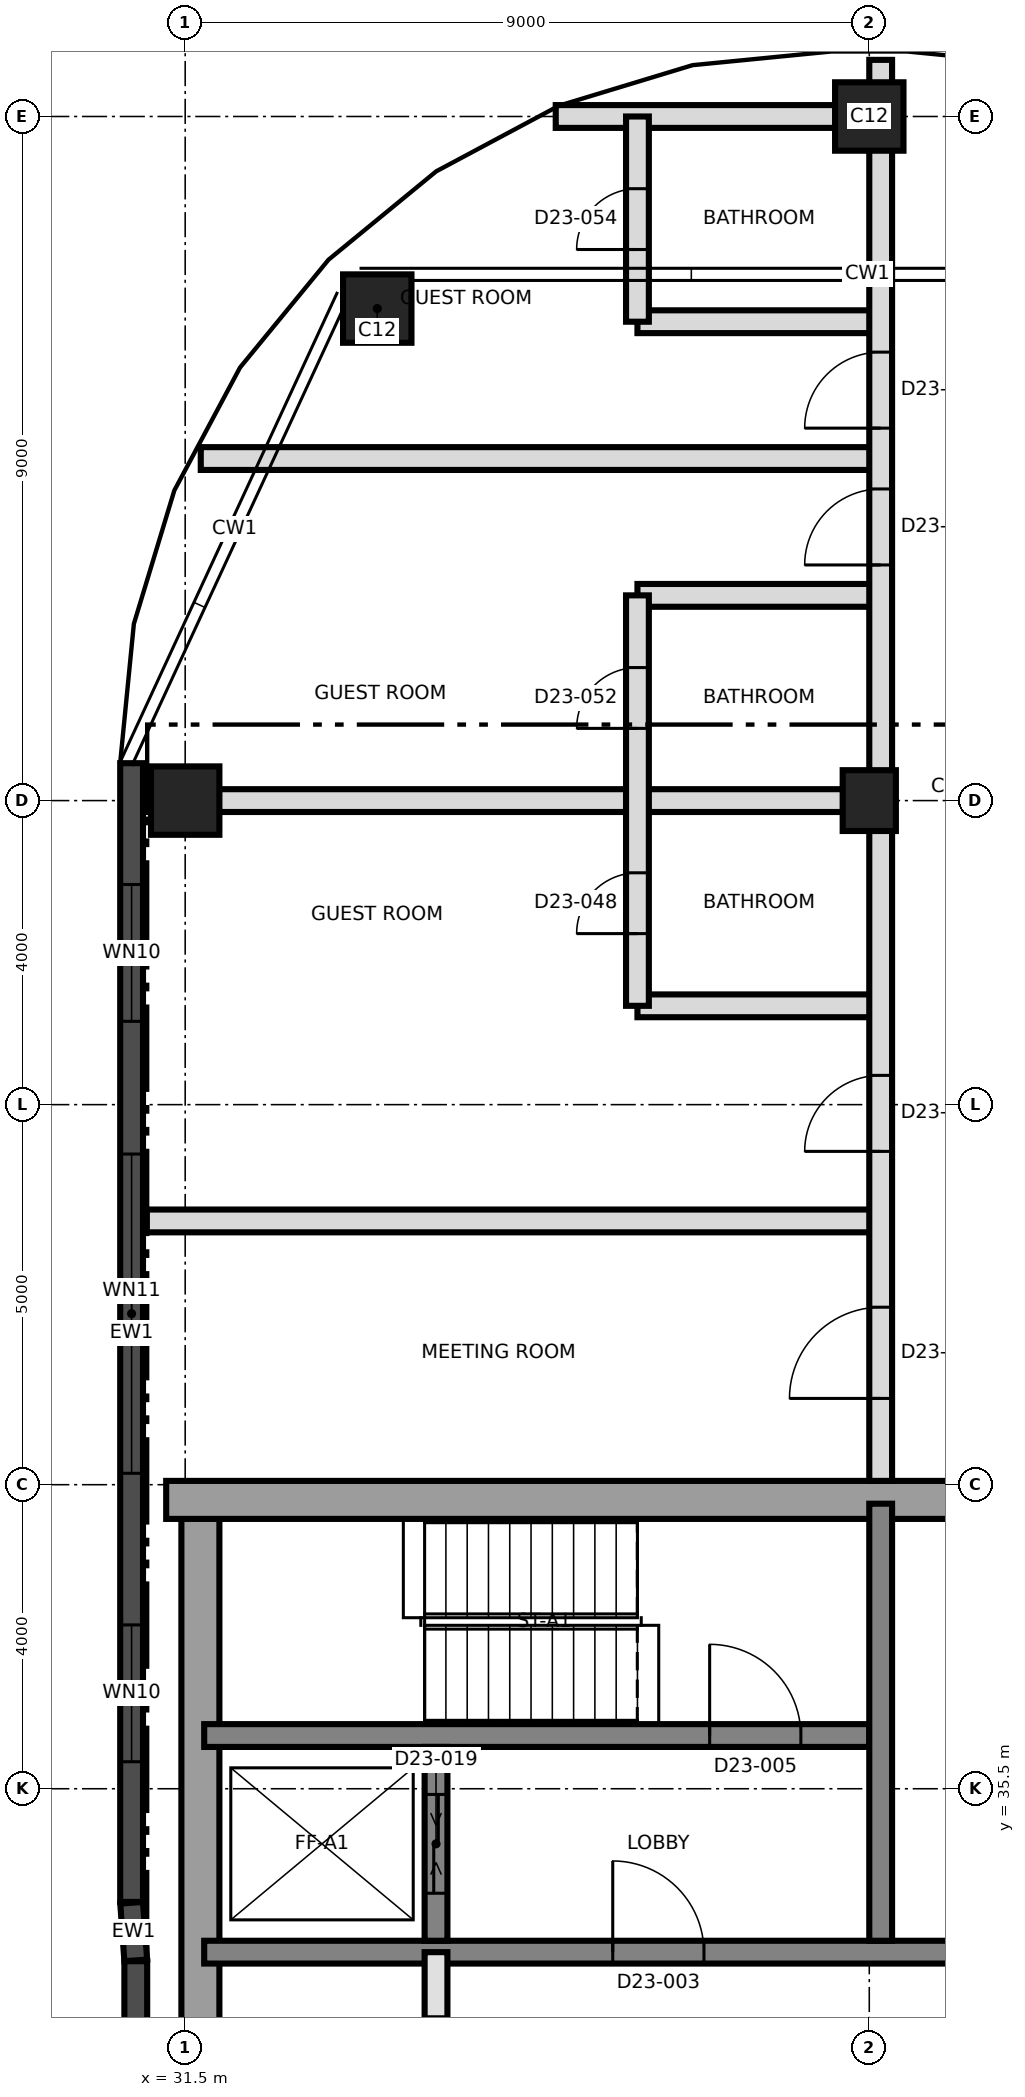
"""IFC4 building model, lengths in metres.
Left out: names, types, materials, properties, quantities, classifications, styles, units other than length and angle.
Written with IfcOpenShell. Run it as: python <this file> out.ifc"""

import sys

from ifc_helpers import new_model, si_unit, direction, frame, frame_2d, origin, origin_2d, place, context, subcontext, project, spatial, rectangle, extrude, element, fill, save


model = new_model("IFC4")
c1 = context("Model", 3, precision=1e-05, world=origin(), true_north=direction((0.0, 1.0)))
c2 = subcontext(c1, "Body", "Model", "MODEL_VIEW")
j1 = project(units=[si_unit("LENGTHUNIT", "METRE"), si_unit("PLANEANGLEUNIT", "RADIAN")], contexts=[c1])
p1 = place(None, origin())
s1 = spatial("IfcSite", under=j1, at=p1, CompositionType="ELEMENT")
p2 = place(p1, origin())
s2 = spatial("IfcBuilding", under=s1, at=p2, CompositionType="ELEMENT")
p3 = place(p2, frame((0.0, 0.0, 210.6)))
s3 = spatial("IfcBuildingStorey", under=s2, at=p3, CompositionType="ELEMENT", Elevation=210.6)
p4 = place(p3, frame((31.7, 21.75, 0.0), z_axis=(0.0, 0.0, 1.0), x_axis=(0.0, 1.0, 0.0)))
e1 = element("IfcWall", 1, at=p4, inside=s3, PredefinedType="SHEAR", context=c2, shape_type="SweptSolid", body=[
    extrude(rectangle(XDim=17.5, YDim=0.5, at=frame_2d((8.75, 0.0))), origin(), (0.0, 0.0, 1.0), 3.7),
])
p5 = place(p3, frame((31.25, 39.3, 0.0), z_axis=(0.0, 0.0, 1.0), x_axis=(1.0, 0.0, 0.0)))
e2 = element("IfcWall", 2, at=p5, inside=s3, PredefinedType="SHEAR", context=c2, shape_type="SweptSolid", body=[
    extrude(rectangle(XDim=27.0, YDim=0.5, at=frame_2d((13.5, 0.0))), origin(), (0.0, 0.0, 1.0), 3.7),
])
p6 = place(p5, frame((10.45, 0.0, 0.0)))
e3 = element("IfcOpeningElement", 3, at=p6, cuts=e2, PredefinedType="OPENING", context=c2, shape_type="SweptSolid", body=[
    extrude(rectangle(XDim=1.2, YDim=2.1, at=frame_2d((0.6, 1.05))), frame((0.0, 0.26, 0.0), z_axis=(0.0, -1.0, 0.0), x_axis=(1.0, 0.0, 0.0)), (0.0, 0.0, 1.0), 0.52),
])
p7 = place(p3, frame((31.75, 33.35, 0.0), z_axis=(0.0, 0.0, 1.0), x_axis=(1.0, 0.0, 0.0)))
e4 = element("IfcWall", 4, at=p7, inside=s3, PredefinedType="SHEAR", context=c2, shape_type="SweptSolid", body=[
    extrude(rectangle(XDim=26.5, YDim=0.3, at=frame_2d((13.25, 0.0))), origin(), (0.0, 0.0, 1.0), 3.7),
])
p8 = place(p7, frame((13.9, 0.0, 0.0)))
e5 = element("IfcOpeningElement", 5, at=p8, cuts=e4, PredefinedType="OPENING", context=c2, shape_type="SweptSolid", body=[
    extrude(rectangle(XDim=1.4, YDim=2.1, at=frame_2d((0.7, 1.05))), frame((0.0, 0.16, 0.0), z_axis=(0.0, -1.0, 0.0), x_axis=(1.0, 0.0, 0.0)), (0.0, 0.0, 1.0), 0.32),
])
p9 = place(p7, frame((5.375, 0.0, 0.0)))
e6 = element("IfcOpeningElement", 6, at=p9, cuts=e4, PredefinedType="OPENING", context=c2, shape_type="SweptSolid", body=[
    extrude(rectangle(XDim=1.2, YDim=2.1, at=frame_2d((0.6, 1.05))), frame((0.0, 0.16, 0.0), z_axis=(0.0, -1.0, 0.0), x_axis=(1.0, 0.0, 0.0)), (0.0, 0.0, 1.0), 0.32),
])
p10 = place(p7, frame((19.925, 0.0, 0.0)))
e7 = element("IfcOpeningElement", 7, at=p10, cuts=e4, PredefinedType="OPENING", context=c2, shape_type="SweptSolid", body=[
    extrude(rectangle(XDim=1.2, YDim=2.1, at=frame_2d((0.6, 1.05))), frame((0.0, 0.16, 0.0), z_axis=(0.0, -1.0, 0.0), x_axis=(1.0, 0.0, 0.0)), (0.0, 0.0, 1.0), 0.32),
])
p11 = place(p3, frame((31.75, 36.2, 0.0), z_axis=(0.0, 0.0, 1.0), x_axis=(1.0, 0.0, 0.0)))
e8 = element("IfcWall", 8, at=p11, inside=s3, PredefinedType="SHEAR", context=c2, shape_type="SweptSolid", body=[
    extrude(rectangle(XDim=8.75, YDim=0.3, at=frame_2d((4.375, 0.0))), origin(), (0.0, 0.0, 1.0), 3.7),
])
p12 = place(p11, frame((6.65, 0.0, 0.0)))
e9 = element("IfcOpeningElement", 9, at=p12, cuts=e8, PredefinedType="OPENING", context=c2, shape_type="SweptSolid", body=[
    extrude(rectangle(XDim=1.2, YDim=2.1, at=frame_2d((0.6, 1.05))), frame((0.0, 0.16, 0.0), z_axis=(0.0, -1.0, 0.0), x_axis=(1.0, 0.0, 0.0)), (0.0, 0.0, 1.0), 0.32),
])
p13 = place(p3, frame((40.65, 33.5, 0.0), z_axis=(0.0, 0.0, 1.0), x_axis=(0.0, 1.0, 0.0)))
e10 = element("IfcWall", 10, at=p13, inside=s3, PredefinedType="SHEAR", context=c2, shape_type="SweptSolid", body=[
    extrude(rectangle(XDim=5.75, YDim=0.3, at=frame_2d((2.875, 0.0))), origin(), (0.0, 0.0, 1.0), 3.7),
])
p14 = place(p3, frame((34.8, 33.5, 0.0), z_axis=(0.0, 0.0, 1.0), x_axis=(0.0, 1.0, 0.0)))
e11 = element("IfcWall", 11, at=p14, inside=s3, PredefinedType="SHEAR", context=c2, shape_type="SweptSolid", body=[
    extrude(rectangle(XDim=2.55, YDim=0.3, at=frame_2d((1.275, 0.0))), origin(), (0.0, 0.0, 1.0), 3.7),
])
p15 = place(p14, frame((0.625, 0.0, 0.0)))
e12 = element("IfcOpeningElement", 12, at=p15, cuts=e11, PredefinedType="OPENING", context=c2, shape_type="SweptSolid", body=[
    extrude(rectangle(XDim=1.3, YDim=2.4, at=frame_2d((0.65, 1.2))), frame((0.0, 0.16, 0.0), z_axis=(0.0, -1.0, 0.0), x_axis=(1.0, 0.0, 0.0)), (0.0, 0.0, 1.0), 0.32),
])
p16 = place(p3, frame((31.5, 48.5, 0.0), z_axis=(0.0, 0.0, 1.0), x_axis=(1.0, 0.0, 0.0)))
e13 = element("IfcColumn", 13, at=p16, inside=s3, PredefinedType="COLUMN", context=c2, shape_type="SweptSolid", body=[
    extrude(rectangle(XDim=0.9, YDim=0.9, at=origin_2d()), origin(), (0.0, 0.0, 1.0), 3.7),
])
p17 = place(p3, frame((40.5, 48.5, 0.0), z_axis=(0.0, 0.0, 1.0), x_axis=(0.0, 1.0, 0.0)))
e14 = element("IfcColumn", 14, at=p17, inside=s3, PredefinedType="COLUMN", context=c2, shape_type="SweptSolid", body=[
    extrude(rectangle(XDim=0.8, YDim=0.7, at=origin_2d()), origin(), (0.0, 0.0, 1.0), 3.7),
])
for number, where, z_axis, x_axis in (
    (15, (34.027, 54.973, 0.0), (0.0, 0.0, 1.0), (1.0, 0.0, 0.0)),
    (16, (40.5, 57.5, 0.0), (0.0, 0.0, 1.0), (1.0, 0.0, 0.0)),
):
    element("IfcColumn", number, at=place(p3, frame(where, z_axis=z_axis, x_axis=x_axis)), inside=s3, PredefinedType="COLUMN", context=c2, shape_type="SweptSolid", body=[
        extrude(rectangle(XDim=0.9, YDim=0.9, at=origin_2d()), origin(), (0.0, 0.0, 1.0), 3.7),
    ])
p18 = place(p3, frame((30.85, 33.231, 0.0), z_axis=(0.0, 0.0, 1.0), x_axis=(0.0, -1.0, 0.0)))
e17 = element("IfcWall", 17, at=p18, inside=s3, PredefinedType="SOLIDWALL", context=c2, shape_type="SweptSolid", body=[
    extrude(rectangle(XDim=11.871, YDim=0.3, at=frame_2d((5.936, 0.0))), origin(), (0.0, 0.0, 1.0), 3.4),
])
p19 = place(p3, frame((30.795, 48.992, 0.0), z_axis=(0.0, 0.0, 1.0), x_axis=(0.0, -1.0, 0.0)))
e18 = element("IfcWall", 18, at=p19, inside=s3, PredefinedType="SOLIDWALL", context=c2, shape_type="SweptSolid", body=[
    extrude(rectangle(XDim=14.981, YDim=0.3, at=frame_2d((7.491, 0.0))), origin(), (0.0, 0.0, 1.0), 3.4),
])
p20 = place(p19, frame((1.596, 0.0, 0.3)))
e19 = element("IfcOpeningElement", 19, at=p20, cuts=e18, PredefinedType="OPENING", context=c2, shape_type="SweptSolid", body=[
    extrude(rectangle(XDim=1.8, YDim=2.4, at=frame_2d((0.9, 1.2))), frame((0.0, 0.16, 0.0), z_axis=(0.0, -1.0, 0.0), x_axis=(1.0, 0.0, 0.0)), (0.0, 0.0, 1.0), 0.32),
])
p21 = place(p19, frame((5.142, 0.0, 0.9)))
e20 = element("IfcOpeningElement", 20, at=p21, cuts=e18, PredefinedType="OPENING", context=c2, shape_type="SweptSolid", body=[
    extrude(rectangle(XDim=4.2, YDim=1.5, at=frame_2d((2.1, 0.75))), frame((0.0, 0.16, 0.0), z_axis=(0.0, -1.0, 0.0), x_axis=(1.0, 0.0, 0.0)), (0.0, 0.0, 1.0), 0.32),
])
p22 = place(p19, frame((11.337, 0.0, 0.3)))
e21 = element("IfcOpeningElement", 21, at=p22, cuts=e18, PredefinedType="OPENING", context=c2, shape_type="SweptSolid", body=[
    extrude(rectangle(XDim=1.8, YDim=2.4, at=frame_2d((0.9, 1.2))), frame((0.0, 0.16, 0.0), z_axis=(0.0, -1.0, 0.0), x_axis=(1.0, 0.0, 0.0)), (0.0, 0.0, 1.0), 0.32),
])
p23 = place(p3, frame((30.795, 34.0, 0.0), z_axis=(0.0, 0.0, 1.0), x_axis=(0.07129269393, -0.997455438499, 0.0)))
e22 = element("IfcWall", 22, at=p23, inside=s3, PredefinedType="SOLIDWALL", context=c2, shape_type="SweptSolid", body=[
    extrude(rectangle(XDim=0.76, YDim=0.3, at=frame_2d((0.38, 0.0))), origin(), (0.0, 0.0, 1.0), 3.4),
])
p24 = place(p3, frame((34.8, 30.65, 0.0), z_axis=(0.0, 0.0, 1.0), x_axis=(0.0, 1.0, 0.0)))
e23 = element("IfcWall", 23, at=p24, inside=s3, PredefinedType="SOLIDWALL", context=c2, shape_type="SweptSolid", body=[
    extrude(rectangle(XDim=2.7, YDim=0.3, at=frame_2d((1.35, 0.0))), origin(), (0.0, 0.0, 1.0), 3.4),
])
p25 = place(p24, frame((0.85, 0.0, 0.0)))
e24 = element("IfcOpeningElement", 24, at=p25, cuts=e23, PredefinedType="OPENING", context=c2, shape_type="SweptSolid", body=[
    extrude(rectangle(XDim=1.0, YDim=2.1, at=frame_2d((0.5, 1.05))), frame((0.0, 0.16, 0.0), z_axis=(0.0, -1.0, 0.0), x_axis=(1.0, 0.0, 0.0)), (0.0, 0.0, 1.0), 0.32),
])
p26 = place(p3, frame((30.995, 42.97, 0.0), z_axis=(0.0, 0.0, 1.0), x_axis=(1.0, 0.0, 0.0)))
e25 = element("IfcWall", 25, at=p26, inside=s3, PredefinedType="PARTITIONING", context=c2, shape_type="SweptSolid", body=[
    extrude(rectangle(XDim=9.655, YDim=0.3, at=frame_2d((4.827, 0.0))), origin(), (0.0, 0.0, 1.0), 3.35),
])
p27 = place(p3, frame((37.45, 45.8, 0.0), z_axis=(0.0, 0.0, 1.0), x_axis=(1.0, 0.0, 0.0)))
e26 = element("IfcWall", 26, at=p27, inside=s3, PredefinedType="PARTITIONING", context=c2, shape_type="SweptSolid", body=[
    extrude(rectangle(XDim=3.2, YDim=0.3, at=frame_2d((1.6, 0.0))), origin(), (0.0, 0.0, 1.0), 3.4),
])
p28 = place(p3, frame((30.995, 48.5, 0.0), z_axis=(0.0, 0.0, 1.0), x_axis=(1.0, 0.0, 0.0)))
e27 = element("IfcWall", 27, at=p28, inside=s3, PredefinedType="PARTITIONING", context=c2, shape_type="SweptSolid", body=[
    extrude(rectangle(XDim=9.655, YDim=0.3, at=frame_2d((4.827, 0.0))), origin(), (0.0, 0.0, 1.0), 3.35),
])
p29 = place(p3, frame((37.45, 51.2, 0.0), z_axis=(0.0, 0.0, 1.0), x_axis=(1.0, 0.0, 0.0)))
e28 = element("IfcWall", 28, at=p29, inside=s3, PredefinedType="PARTITIONING", context=c2, shape_type="SweptSolid", body=[
    extrude(rectangle(XDim=3.2, YDim=0.3, at=frame_2d((1.6, 0.0))), origin(), (0.0, 0.0, 1.0), 3.4),
])
p30 = place(p3, frame((31.705, 53.0, 0.0), z_axis=(0.0, 0.0, 1.0), x_axis=(1.0, 0.0, 0.0)))
e29 = element("IfcWall", 29, at=p30, inside=s3, PredefinedType="PARTITIONING", context=c2, shape_type="SweptSolid", body=[
    extrude(rectangle(XDim=8.945, YDim=0.3, at=frame_2d((4.472, 0.0))), origin(), (0.0, 0.0, 1.0), 3.35),
])
p31 = place(p3, frame((37.45, 54.8, 0.0), z_axis=(0.0, 0.0, 1.0), x_axis=(1.0, 0.0, 0.0)))
e30 = element("IfcWall", 30, at=p31, inside=s3, PredefinedType="PARTITIONING", context=c2, shape_type="SweptSolid", body=[
    extrude(rectangle(XDim=3.2, YDim=0.3, at=frame_2d((1.6, 0.0))), origin(), (0.0, 0.0, 1.0), 3.4),
])
p32 = place(p3, frame((36.375, 57.5, 0.0), z_axis=(0.0, 0.0, 1.0), x_axis=(1.0, 0.0, 0.0)))
e31 = element("IfcWall", 31, at=p32, inside=s3, PredefinedType="PARTITIONING", context=c2, shape_type="SweptSolid", body=[
    extrude(rectangle(XDim=4.275, YDim=0.3, at=frame_2d((2.137, 0.0))), origin(), (0.0, 0.0, 1.0), 3.35),
])
p33 = place(p3, frame((37.45, 45.8, 0.0), z_axis=(0.0, 0.0, 1.0), x_axis=(0.0, 1.0, 0.0)))
e32 = element("IfcWall", 32, at=p33, inside=s3, PredefinedType="PARTITIONING", context=c2, shape_type="SweptSolid", body=[
    extrude(rectangle(XDim=5.4, YDim=0.3, at=frame_2d((2.7, 0.0))), origin(), (0.0, 0.0, 1.0), 3.4),
])
p34 = place(p33, frame((0.95, 0.0, 0.0)))
e33 = element("IfcOpeningElement", 33, at=p34, cuts=e32, PredefinedType="OPENING", context=c2, shape_type="SweptSolid", body=[
    extrude(rectangle(XDim=0.8, YDim=2.1, at=frame_2d((0.4, 1.05))), frame((0.0, 0.16, 0.0), z_axis=(0.0, -1.0, 0.0), x_axis=(1.0, 0.0, 0.0)), (0.0, 0.0, 1.0), 0.32),
])
p35 = place(p33, frame((3.65, 0.0, 0.0)))
e34 = element("IfcOpeningElement", 34, at=p35, cuts=e32, PredefinedType="OPENING", context=c2, shape_type="SweptSolid", body=[
    extrude(rectangle(XDim=0.8, YDim=2.1, at=frame_2d((0.4, 1.05))), frame((0.0, 0.16, 0.0), z_axis=(0.0, -1.0, 0.0), x_axis=(1.0, 0.0, 0.0)), (0.0, 0.0, 1.0), 0.32),
])
p36 = place(p3, frame((37.45, 54.8, 0.0), z_axis=(0.0, 0.0, 1.0), x_axis=(0.0, 1.0, 0.0)))
e35 = element("IfcWall", 35, at=p36, inside=s3, PredefinedType="PARTITIONING", context=c2, shape_type="SweptSolid", body=[
    extrude(rectangle(XDim=2.7, YDim=0.3, at=frame_2d((1.35, 0.0))), origin(), (0.0, 0.0, 1.0), 3.35),
])
p37 = place(p36, frame((0.95, 0.0, 0.0)))
e36 = element("IfcOpeningElement", 36, at=p37, cuts=e35, PredefinedType="OPENING", context=c2, shape_type="SweptSolid", body=[
    extrude(rectangle(XDim=0.8, YDim=2.1, at=frame_2d((0.4, 1.05))), frame((0.0, 0.16, 0.0), z_axis=(0.0, -1.0, 0.0), x_axis=(1.0, 0.0, 0.0)), (0.0, 0.0, 1.0), 0.32),
])
p38 = place(p3, frame((40.65, 39.55, 0.0), z_axis=(0.0, 0.0, 1.0), x_axis=(0.0, 1.0, 0.0)))
e37 = element("IfcWall", 37, at=p38, inside=s3, PredefinedType="PARTITIONING", context=c2, shape_type="SweptSolid", body=[
    extrude(rectangle(XDim=18.695, YDim=0.3, at=frame_2d((9.348, 0.0))), origin(), (0.0, 0.0, 1.0), 3.35),
])
p39 = place(p38, frame((1.085, 0.0, 0.0)))
e38 = element("IfcOpeningElement", 38, at=p39, cuts=e37, PredefinedType="OPENING", context=c2, shape_type="SweptSolid", body=[
    extrude(rectangle(XDim=1.2, YDim=2.1, at=frame_2d((0.6, 1.05))), frame((0.0, 0.16, 0.0), z_axis=(0.0, -1.0, 0.0), x_axis=(1.0, 0.0, 0.0)), (0.0, 0.0, 1.0), 0.32),
])
p40 = place(p38, frame((4.335, 0.0, 0.0)))
e39 = element("IfcOpeningElement", 39, at=p40, cuts=e37, PredefinedType="OPENING", context=c2, shape_type="SweptSolid", body=[
    extrude(rectangle(XDim=1.0, YDim=2.1, at=frame_2d((0.5, 1.05))), frame((0.0, 0.16, 0.0), z_axis=(0.0, -1.0, 0.0), x_axis=(1.0, 0.0, 0.0)), (0.0, 0.0, 1.0), 0.32),
])
p41 = place(p38, frame((12.05, 0.0, 0.0)))
e40 = element("IfcOpeningElement", 40, at=p41, cuts=e37, PredefinedType="OPENING", context=c2, shape_type="SweptSolid", body=[
    extrude(rectangle(XDim=1.0, YDim=2.1, at=frame_2d((0.5, 1.05))), frame((0.0, 0.16, 0.0), z_axis=(0.0, -1.0, 0.0), x_axis=(1.0, 0.0, 0.0)), (0.0, 0.0, 1.0), 0.32),
])
p42 = place(p38, frame((13.85, 0.0, 0.0)))
e41 = element("IfcOpeningElement", 41, at=p42, cuts=e37, PredefinedType="OPENING", context=c2, shape_type="SweptSolid", body=[
    extrude(rectangle(XDim=1.0, YDim=2.1, at=frame_2d((0.5, 1.05))), frame((0.0, 0.16, 0.0), z_axis=(0.0, -1.0, 0.0), x_axis=(1.0, 0.0, 0.0)), (0.0, 0.0, 1.0), 0.32),
])
p43 = place(p20, origin())
e42 = element("IfcWindow", 42, at=p43, inside=s3, PartitioningType="SINGLE_PANEL", PredefinedType="WINDOW", context=c2, shape_type="SweptSolid", body=[
    extrude(rectangle(XDim=1.8, YDim=2.4, at=frame_2d((0.9, 1.2))), frame((0.0, 0.03, 0.0), z_axis=(0.0, -1.0, 0.0), x_axis=(1.0, 0.0, 0.0)), (0.0, 0.0, 1.0), 0.06),
])
fill(e19, e42)
p44 = place(p21, origin())
e43 = element("IfcWindow", 43, at=p44, inside=s3, PartitioningType="SINGLE_PANEL", PredefinedType="WINDOW", context=c2, shape_type="SweptSolid", body=[
    extrude(rectangle(XDim=4.2, YDim=1.5, at=frame_2d((2.1, 0.75))), frame((0.0, 0.03, 0.0), z_axis=(0.0, -1.0, 0.0), x_axis=(1.0, 0.0, 0.0)), (0.0, 0.0, 1.0), 0.06),
])
fill(e20, e43)
p45 = place(p22, origin())
e44 = element("IfcWindow", 44, at=p45, inside=s3, PartitioningType="SINGLE_PANEL", PredefinedType="WINDOW", context=c2, shape_type="SweptSolid", body=[
    extrude(rectangle(XDim=1.8, YDim=2.4, at=frame_2d((0.9, 1.2))), frame((0.0, 0.03, 0.0), z_axis=(0.0, -1.0, 0.0), x_axis=(1.0, 0.0, 0.0)), (0.0, 0.0, 1.0), 0.06),
])
fill(e21, e44)
p46 = place(p9, origin())
e45 = element("IfcDoor", 45, at=p46, inside=s3, OperationType="SINGLE_SWING_LEFT", PredefinedType="DOOR", context=c2, shape_type="SweptSolid", body=[
    extrude(rectangle(XDim=1.2, YDim=2.1, at=frame_2d((0.6, 1.05))), frame((0.0, 0.025, 0.0), z_axis=(0.0, -1.0, 0.0), x_axis=(1.0, 0.0, 0.0)), (0.0, 0.0, 1.0), 0.05),
])
fill(e6, e45)
p47 = place(p12, origin())
e46 = element("IfcDoor", 46, at=p47, inside=s3, OperationType="SINGLE_SWING_RIGHT", PredefinedType="DOOR", context=c2, shape_type="SweptSolid", body=[
    extrude(rectangle(XDim=1.2, YDim=2.1, at=frame_2d((0.6, 1.05))), frame((0.0, 0.025, 0.0), z_axis=(0.0, -1.0, 0.0), x_axis=(1.0, 0.0, 0.0)), (0.0, 0.0, 1.0), 0.05),
])
fill(e9, e46)
p48 = place(p15, origin())
e47 = element("IfcDoor", 47, at=p48, inside=s3, OperationType="SLIDING_TO_LEFT", PredefinedType="DOOR", context=c2, shape_type="SweptSolid", body=[
    extrude(rectangle(XDim=1.3, YDim=2.4, at=frame_2d((0.65, 1.2))), frame((0.0, 0.025, 0.0), z_axis=(0.0, -1.0, 0.0), x_axis=(1.0, 0.0, 0.0)), (0.0, 0.0, 1.0), 0.05),
])
fill(e12, e47)
p49 = place(p39, origin())
e48 = element("IfcDoor", 48, at=p49, inside=s3, OperationType="SINGLE_SWING_RIGHT", PredefinedType="DOOR", context=c2, shape_type="SweptSolid", body=[
    extrude(rectangle(XDim=1.2, YDim=2.1, at=frame_2d((0.6, 1.05))), frame((0.0, 0.025, 0.0), z_axis=(0.0, -1.0, 0.0), x_axis=(1.0, 0.0, 0.0)), (0.0, 0.0, 1.0), 0.05),
])
fill(e38, e48)
p50 = place(p34, origin())
e49 = element("IfcDoor", 49, at=p50, inside=s3, OperationType="SINGLE_SWING_LEFT", PredefinedType="DOOR", context=c2, shape_type="SweptSolid", body=[
    extrude(rectangle(XDim=0.8, YDim=2.1, at=frame_2d((0.4, 1.05))), frame((0.0, 0.025, 0.0), z_axis=(0.0, -1.0, 0.0), x_axis=(1.0, 0.0, 0.0)), (0.0, 0.0, 1.0), 0.05),
])
fill(e33, e49)
p51 = place(p40, origin())
e50 = element("IfcDoor", 50, at=p51, inside=s3, OperationType="SINGLE_SWING_LEFT", PredefinedType="DOOR", context=c2, shape_type="SweptSolid", body=[
    extrude(rectangle(XDim=1.0, YDim=2.1, at=frame_2d((0.5, 1.05))), frame((0.0, 0.025, 0.0), z_axis=(0.0, -1.0, 0.0), x_axis=(1.0, 0.0, 0.0)), (0.0, 0.0, 1.0), 0.05),
])
fill(e39, e50)
p52 = place(p35, origin())
e51 = element("IfcDoor", 51, at=p52, inside=s3, OperationType="SINGLE_SWING_RIGHT", PredefinedType="DOOR", context=c2, shape_type="SweptSolid", body=[
    extrude(rectangle(XDim=0.8, YDim=2.1, at=frame_2d((0.4, 1.05))), frame((0.0, 0.025, 0.0), z_axis=(0.0, -1.0, 0.0), x_axis=(1.0, 0.0, 0.0)), (0.0, 0.0, 1.0), 0.05),
])
fill(e34, e51)
p53 = place(p41, origin())
e52 = element("IfcDoor", 52, at=p53, inside=s3, OperationType="SINGLE_SWING_LEFT", PredefinedType="DOOR", context=c2, shape_type="SweptSolid", body=[
    extrude(rectangle(XDim=1.0, YDim=2.1, at=frame_2d((0.5, 1.05))), frame((0.0, 0.025, 0.0), z_axis=(0.0, -1.0, 0.0), x_axis=(1.0, 0.0, 0.0)), (0.0, 0.0, 1.0), 0.05),
])
fill(e40, e52)
p54 = place(p37, origin())
e53 = element("IfcDoor", 53, at=p54, inside=s3, OperationType="SINGLE_SWING_LEFT", PredefinedType="DOOR", context=c2, shape_type="SweptSolid", body=[
    extrude(rectangle(XDim=0.8, YDim=2.1, at=frame_2d((0.4, 1.05))), frame((0.0, 0.025, 0.0), z_axis=(0.0, -1.0, 0.0), x_axis=(1.0, 0.0, 0.0)), (0.0, 0.0, 1.0), 0.05),
])
fill(e36, e53)
p55 = place(p42, origin())
e54 = element("IfcDoor", 54, at=p55, inside=s3, OperationType="SINGLE_SWING_LEFT", PredefinedType="DOOR", context=c2, shape_type="SweptSolid", body=[
    extrude(rectangle(XDim=1.0, YDim=2.1, at=frame_2d((0.5, 1.05))), frame((0.0, 0.025, 0.0), z_axis=(0.0, -1.0, 0.0), x_axis=(1.0, 0.0, 0.0)), (0.0, 0.0, 1.0), 0.05),
])
fill(e41, e54)
save(model, sys.argv[1])
